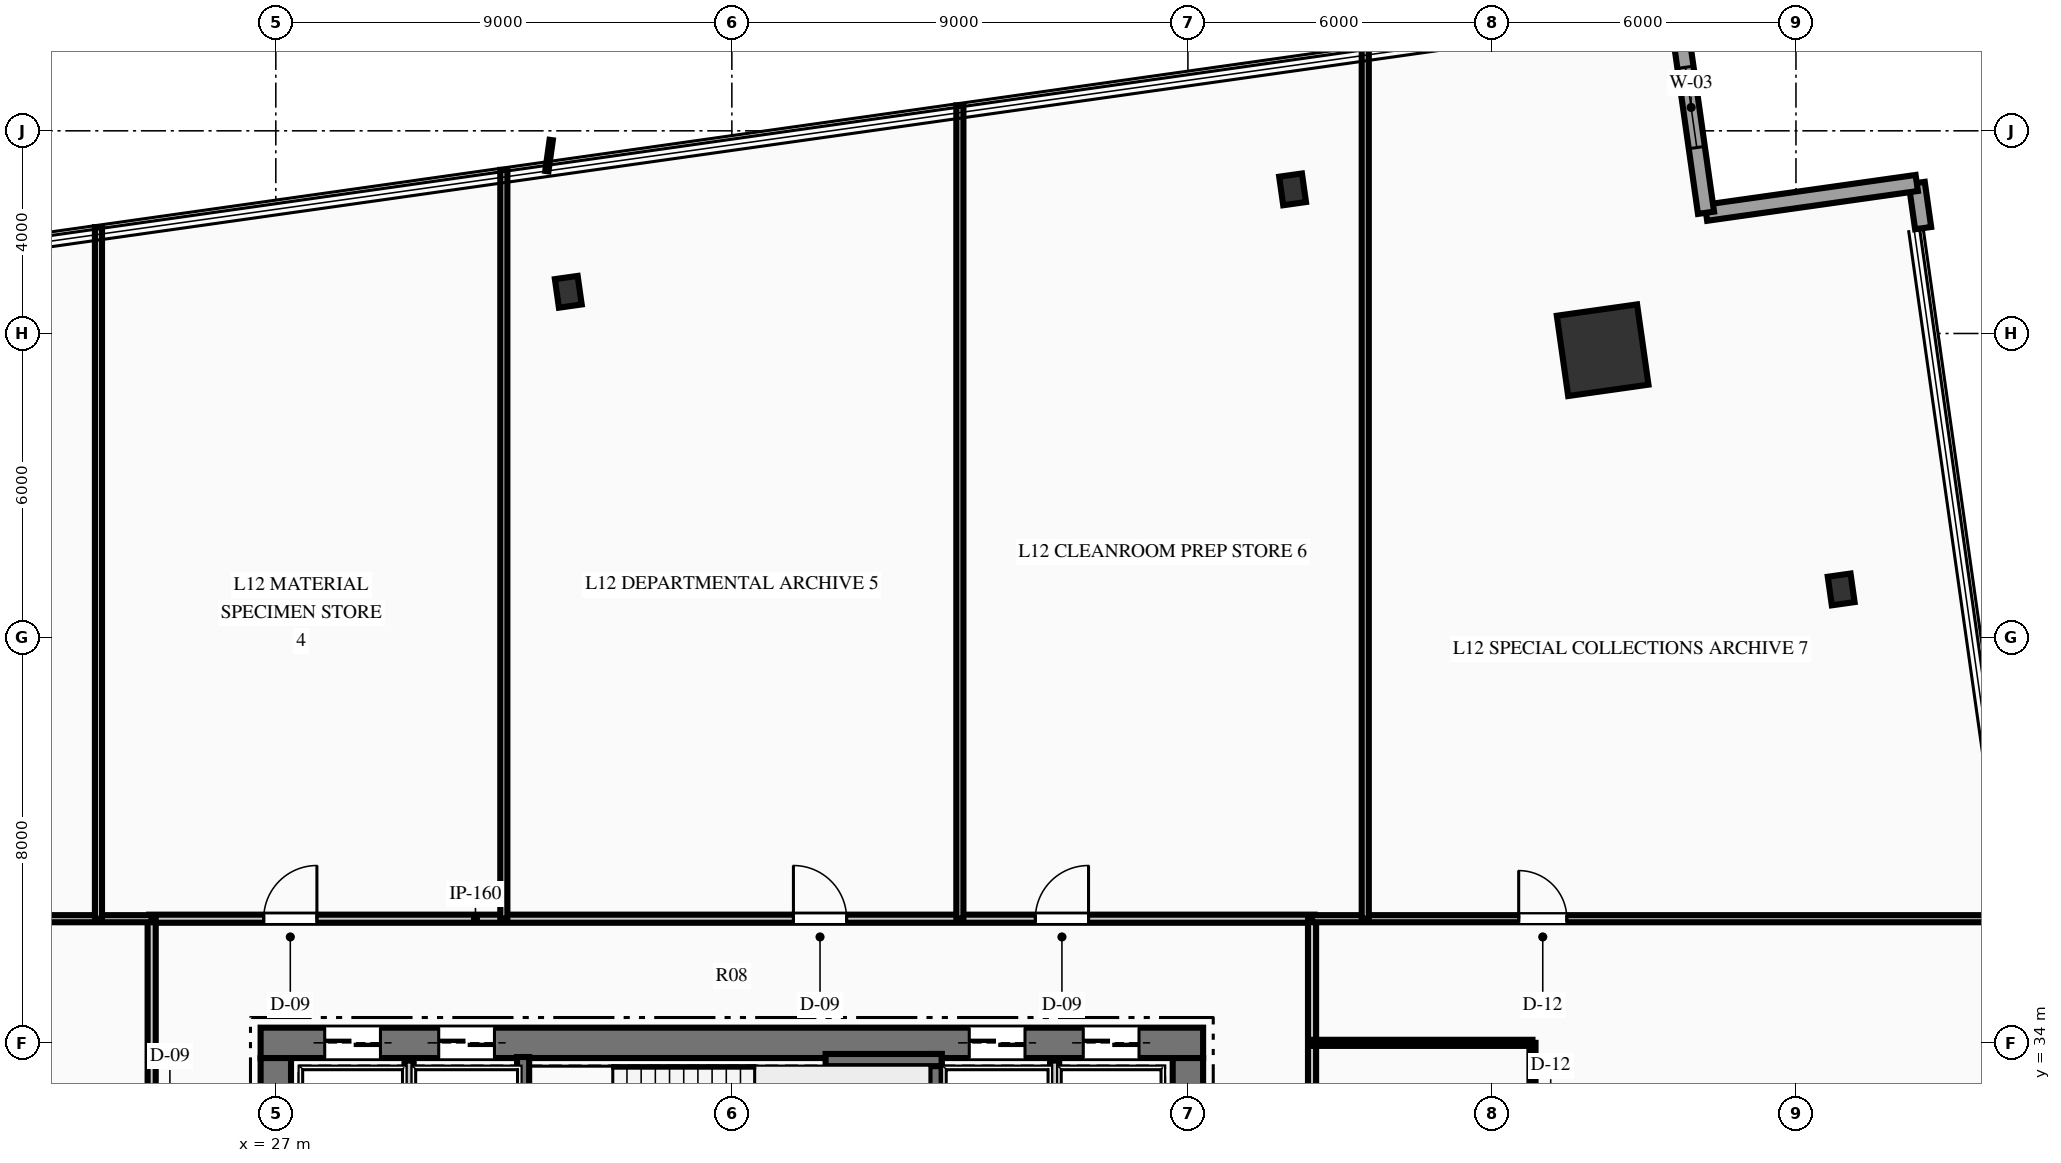
"""IFC4 building model, lengths in metres.
Left out: names, types, materials, properties, quantities, classifications, styles, units other than length and angle.
Written with IfcOpenShell. Run it as: python <this file> out.ifc"""

import sys

from ifc_helpers import new_model, si_unit, direction, frame, frame_2d, origin, origin_2d, place, context, subcontext, project, spatial, rectangle, hollow_rectangle, i_section, extrude, element, fill, save


model = new_model("IFC4")
c1 = context("Model", 3, precision=1e-05, world=origin(), true_north=direction((0.0, 1.0)))
c2 = subcontext(c1, "Body", "Model", "MODEL_VIEW")
j1 = project(units=[si_unit("LENGTHUNIT", "METRE"), si_unit("PLANEANGLEUNIT", "RADIAN")], contexts=[c1])
p1 = place(None, origin())
s1 = spatial("IfcSite", under=j1, at=p1, CompositionType="ELEMENT")
p2 = place(p1, origin())
s2 = spatial("IfcBuilding", under=s1, at=p2, CompositionType="ELEMENT")
p3 = place(p2, frame((0.0, 0.0, 55.2)))
s3 = spatial("IfcBuildingStorey", under=s2, at=p3, CompositionType="ELEMENT", Elevation=55.2)
p4 = place(p3, frame((26.7, 34.0, 0.0), z_axis=(0.0, 0.0, 1.0), x_axis=(1.0, 0.0, 0.0)))
e1 = element("IfcWall", 1, at=p4, inside=s3, PredefinedType="SHEAR", context=c2, shape_type="SweptSolid", body=[
    extrude(rectangle(XDim=18.6, YDim=0.6, at=frame_2d((9.3, 0.0))), origin(), (0.0, 0.0, 1.0), 3.75),
])
p5 = place(p4, frame((1.265, 0.0, 0.0)))
e2 = element("IfcOpeningElement", 2, at=p5, cuts=e1, PredefinedType="OPENING", context=c2, shape_type="SweptSolid", body=[
    extrude(rectangle(XDim=1.1, YDim=2.15, at=frame_2d((0.55, 1.075))), frame((0.0, 0.31, 0.0), z_axis=(0.0, -1.0, 0.0), x_axis=(1.0, 0.0, 0.0)), (0.0, 0.0, 1.0), 0.62),
])
p6 = place(p4, frame((3.515, 0.0, 0.0)))
e3 = element("IfcOpeningElement", 3, at=p6, cuts=e1, PredefinedType="OPENING", context=c2, shape_type="SweptSolid", body=[
    extrude(rectangle(XDim=1.1, YDim=2.15, at=frame_2d((0.55, 1.075))), frame((0.0, 0.31, 0.0), z_axis=(0.0, -1.0, 0.0), x_axis=(1.0, 0.0, 0.0)), (0.0, 0.0, 1.0), 0.62),
])
p7 = place(p4, frame((13.985, 0.0, 0.0)))
e4 = element("IfcOpeningElement", 4, at=p7, cuts=e1, PredefinedType="OPENING", context=c2, shape_type="SweptSolid", body=[
    extrude(rectangle(XDim=1.1, YDim=2.15, at=frame_2d((0.55, 1.075))), frame((0.0, 0.31, 0.0), z_axis=(0.0, -1.0, 0.0), x_axis=(1.0, 0.0, 0.0)), (0.0, 0.0, 1.0), 0.62),
])
p8 = place(p4, frame((16.235, 0.0, 0.0)))
e5 = element("IfcOpeningElement", 5, at=p8, cuts=e1, PredefinedType="OPENING", context=c2, shape_type="SweptSolid", body=[
    extrude(rectangle(XDim=1.1, YDim=2.15, at=frame_2d((0.55, 1.075))), frame((0.0, 0.31, 0.0), z_axis=(0.0, -1.0, 0.0), x_axis=(1.0, 0.0, 0.0)), (0.0, 0.0, 1.0), 0.62),
])
p9 = place(p3, frame((27.0, 18.3, 0.0), z_axis=(0.0, 0.0, 1.0), x_axis=(0.0, 1.0, 0.0)))
e6 = element("IfcWall", 6, at=p9, inside=s3, PredefinedType="SHEAR", context=c2, shape_type="SweptSolid", body=[
    extrude(rectangle(XDim=15.4, YDim=0.6, at=frame_2d((7.7, 0.0))), origin(), (0.0, 0.0, 1.0), 3.75),
])
p10 = place(p9, frame((9.94, 0.0, 0.0)))
e7 = element("IfcOpeningElement", 7, at=p10, cuts=e6, PredefinedType="OPENING", context=c2, shape_type="SweptSolid", body=[
    extrude(rectangle(XDim=1.4, YDim=2.2, at=frame_2d((0.7, 1.1))), frame((0.0, 0.31, 0.0), z_axis=(0.0, -1.0, 0.0), x_axis=(1.0, 0.0, 0.0)), (0.0, 0.0, 1.0), 0.62),
])
p11 = place(p3, frame((45.0, 18.3, 0.0), z_axis=(0.0, 0.0, 1.0), x_axis=(0.0, 1.0, 0.0)))
e8 = element("IfcWall", 8, at=p11, inside=s3, PredefinedType="SHEAR", context=c2, shape_type="SweptSolid", body=[
    extrude(rectangle(XDim=15.4, YDim=0.6, at=frame_2d((7.7, 0.0))), origin(), (0.0, 0.0, 1.0), 3.75),
])
p12 = place(p11, frame((9.94, 0.0, 0.0)))
e9 = element("IfcOpeningElement", 9, at=p12, cuts=e8, PredefinedType="OPENING", context=c2, shape_type="SweptSolid", body=[
    extrude(rectangle(XDim=1.4, YDim=2.2, at=frame_2d((0.7, 1.1))), frame((0.0, 0.31, 0.0), z_axis=(0.0, -1.0, 0.0), x_axis=(1.0, 0.0, 0.0)), (0.0, 0.0, 1.0), 0.62),
])
p13 = place(p3, frame((31.88, 29.93, 0.0), z_axis=(0.0, 0.0, 1.0), x_axis=(0.0, 1.0, 0.0)))
e10 = element("IfcWall", 10, at=p13, inside=s3, PredefinedType="SHEAR", context=c2, shape_type="SweptSolid", body=[
    extrude(rectangle(XDim=3.79, YDim=0.24, at=frame_2d((1.895, 0.0))), origin(), (0.0, 0.0, 1.0), 3.75),
])
p14 = place(p3, frame((40.02, 29.93, 0.0), z_axis=(0.0, 0.0, 1.0), x_axis=(0.0, 1.0, 0.0)))
e11 = element("IfcWall", 11, at=p14, inside=s3, PredefinedType="SHEAR", context=c2, shape_type="SweptSolid", body=[
    extrude(rectangle(XDim=3.85, YDim=0.24, at=frame_2d((1.925, 0.0))), origin(), (0.0, 0.0, 1.0), 3.75),
])
p15 = place(p3, frame((37.85, 33.66, 0.0), z_axis=(0.0, 0.0, 1.0), x_axis=(1.0, 0.0, 0.0)))
e12 = element("IfcWall", 12, at=p15, inside=s3, PredefinedType="SHEAR", context=c2, shape_type="SweptSolid", body=[
    extrude(rectangle(XDim=2.29, YDim=0.24, at=frame_2d((1.145, 0.0))), origin(), (0.0, 0.0, 1.0), 3.75),
])
p16 = place(p3, frame((53.185, 47.67, 0.0), z_axis=(0.0, 0.0, 1.0), x_axis=(0.990146240249, 0.140037219771, 0.0)))
e13 = element("IfcColumn", 13, at=p16, inside=s3, PredefinedType="COLUMN", context=c2, shape_type="SweptSolid", body=[
    extrude(hollow_rectangle(XDim=1.6, YDim=1.6, WallThickness=0.08, at=origin_2d()), origin(), (0.0, 0.0, 1.0), 3.75),
])
for number, where, z_axis, x_axis in (
    (14, (57.892, 42.949, 0.0), (0.0, 0.0, 1.0), (0.99, 0.14, 0.0)),
    (15, (47.066, 50.844, 0.0), (0.0, 0.0, 1.0), (0.99, 0.14, 0.0)),
    (16, (32.772, 48.823, 0.0), (0.0, 0.0, 1.0), (0.99, 0.14, 0.0)),
):
    element("IfcColumn", number, at=place(p3, frame(where, z_axis=z_axis, x_axis=x_axis)), inside=s3, PredefinedType="COLUMN", context=c2, shape_type="SweptSolid", body=[
        extrude(i_section(OverallWidth=0.454, OverallDepth=0.569, WebThickness=0.078, FlangeThickness=0.125, at=origin_2d()), origin(), (0.0, 0.0, 1.0), 3.75),
    ])
p17 = place(p3, frame((59.384, 50.971, 0.0), z_axis=(0.0, 0.0, 1.0), x_axis=(0.139978021702, -0.990154610877, 0.0)))
e17 = element("IfcWall", 17, at=p17, inside=s3, PredefinedType="STANDARD", context=c2, shape_type="SweptSolid", body=[
    extrude(rectangle(XDim=0.9, YDim=0.32, at=frame_2d((0.45, 0.0))), origin(), (0.0, 0.0, 1.0), 3.44),
])
p18 = place(p3, frame((55.225, 50.383, 0.0), z_axis=(0.0, 0.0, 1.0), x_axis=(0.990146172451, 0.140037699139, 0.0)))
e18 = element("IfcWall", 18, at=p18, inside=s3, PredefinedType="STANDARD", context=c2, shape_type="SweptSolid", body=[
    extrude(rectangle(XDim=4.2, YDim=0.32, at=frame_2d((2.1, 0.0))), origin(), (0.0, 0.0, 1.0), 3.44),
])
p19 = place(p3, frame((54.637, 54.541, 0.0), z_axis=(0.0, 0.0, 1.0), x_axis=(0.140094689511, -0.990138110554, 0.0)))
e19 = element("IfcWall", 19, at=p19, inside=s3, PredefinedType="STANDARD", context=c2, shape_type="SweptSolid", body=[
    extrude(rectangle(XDim=4.2, YDim=0.32, at=frame_2d((2.1, 0.0))), origin(), (0.0, 0.0, 1.0), 3.44),
])
p20 = place(p19, frame((1.3, 0.0, 0.85)))
e20 = element("IfcOpeningElement", 20, at=p20, cuts=e19, PredefinedType="OPENING", context=c2, shape_type="SweptSolid", body=[
    extrude(rectangle(XDim=1.6, YDim=2.1, at=frame_2d((0.8, 1.05))), frame((0.0, 0.17, 0.0), z_axis=(0.0, -1.0, 0.0), x_axis=(1.0, 0.0, 0.0)), (0.0, 0.0, 1.0), 0.34),
])
for number, where, z_axis, x_axis in (
    (21, (29.63, 29.9, 0.0), (0.0, 0.0, 1.0), (0.0, 1.0, 0.0)),
    (22, (42.37, 29.9, 0.0), (0.0, 0.0, 1.0), (0.0, 1.0, 0.0)),
):
    element("IfcWall", number, at=place(p3, frame(where, z_axis=z_axis, x_axis=x_axis)), inside=s3, PredefinedType="PARTITIONING", context=c2, shape_type="SweptSolid", body=[
        extrude(rectangle(XDim=3.75, YDim=0.18, at=frame_2d((1.875, 0.0))), origin(), (0.0, 0.0, 1.0), 3.44),
    ])
p21 = place(p3, frame((24.5, 36.45, 0.0), z_axis=(0.0, 0.0, 1.0), x_axis=(1.0, 0.0, 0.0)))
e23 = element("IfcWall", 23, at=p21, inside=s3, PredefinedType="PARTITIONING", context=c2, shape_type="SweptSolid", body=[
    extrude(rectangle(XDim=23.0, YDim=0.16, at=frame_2d((11.5, 0.0))), origin(), (0.0, 0.0, 1.0), 3.44),
])
p22 = place(p21, frame((2.261, 0.0, 0.0)))
e24 = element("IfcOpeningElement", 24, at=p22, cuts=e23, PredefinedType="OPENING", context=c2, shape_type="SweptSolid", body=[
    extrude(rectangle(XDim=1.05, YDim=2.15, at=frame_2d((0.525, 1.075))), frame((0.0, 0.09, 0.0), z_axis=(0.0, -1.0, 0.0), x_axis=(1.0, 0.0, 0.0)), (0.0, 0.0, 1.0), 0.18),
])
p23 = place(p21, frame((12.715, 0.0, 0.0)))
e25 = element("IfcOpeningElement", 25, at=p23, cuts=e23, PredefinedType="OPENING", context=c2, shape_type="SweptSolid", body=[
    extrude(rectangle(XDim=1.05, YDim=2.15, at=frame_2d((0.525, 1.075))), frame((0.0, 0.09, 0.0), z_axis=(0.0, -1.0, 0.0), x_axis=(1.0, 0.0, 0.0)), (0.0, 0.0, 1.0), 0.18),
])
p24 = place(p21, frame((17.489, 0.0, 0.0)))
e26 = element("IfcOpeningElement", 26, at=p24, cuts=e23, PredefinedType="OPENING", context=c2, shape_type="SweptSolid", body=[
    extrude(rectangle(XDim=1.05, YDim=2.15, at=frame_2d((0.525, 1.075))), frame((0.0, 0.09, 0.0), z_axis=(0.0, -1.0, 0.0), x_axis=(1.0, 0.0, 0.0)), (0.0, 0.0, 1.0), 0.18),
])
p25 = place(p3, frame((24.55, 15.55, 0.0), z_axis=(0.0, 0.0, 1.0), x_axis=(0.0, 1.0, 0.0)))
e27 = element("IfcWall", 27, at=p25, inside=s3, PredefinedType="PARTITIONING", context=c2, shape_type="SweptSolid", body=[
    extrude(rectangle(XDim=20.9, YDim=0.16, at=frame_2d((10.45, 0.0))), origin(), (0.0, 0.0, 1.0), 3.44),
])
p26 = place(p25, frame((2.445, 0.0, 0.0)))
e28 = element("IfcOpeningElement", 28, at=p26, cuts=e27, PredefinedType="OPENING", context=c2, shape_type="SweptSolid", body=[
    extrude(rectangle(XDim=1.05, YDim=2.15, at=frame_2d((0.525, 1.075))), frame((0.0, 0.09, 0.0), z_axis=(0.0, -1.0, 0.0), x_axis=(1.0, 0.0, 0.0)), (0.0, 0.0, 1.0), 0.18),
])
p27 = place(p25, frame((12.829, 0.0, 0.0)))
e29 = element("IfcOpeningElement", 29, at=p27, cuts=e27, PredefinedType="OPENING", context=c2, shape_type="SweptSolid", body=[
    extrude(rectangle(XDim=1.05, YDim=2.15, at=frame_2d((0.525, 1.075))), frame((0.0, 0.09, 0.0), z_axis=(0.0, -1.0, 0.0), x_axis=(1.0, 0.0, 0.0)), (0.0, 0.0, 1.0), 0.18),
])
p28 = place(p25, frame((16.307, 0.0, 0.0)))
e30 = element("IfcOpeningElement", 30, at=p28, cuts=e27, PredefinedType="OPENING", context=c2, shape_type="SweptSolid", body=[
    extrude(rectangle(XDim=1.05, YDim=2.15, at=frame_2d((0.525, 1.075))), frame((0.0, 0.09, 0.0), z_axis=(0.0, -1.0, 0.0), x_axis=(1.0, 0.0, 0.0)), (0.0, 0.0, 1.0), 0.18),
])
p29 = place(p3, frame((47.45, 15.55, 0.0), z_axis=(0.0, 0.0, 1.0), x_axis=(0.0, 1.0, 0.0)))
e31 = element("IfcWall", 31, at=p29, inside=s3, PredefinedType="PARTITIONING", context=c2, shape_type="SweptSolid", body=[
    extrude(rectangle(XDim=20.9, YDim=0.16, at=frame_2d((10.45, 0.0))), origin(), (0.0, 0.0, 1.0), 3.44),
])
p30 = place(p29, frame((14.975, 0.0, 0.0)))
e32 = element("IfcOpeningElement", 32, at=p30, cuts=e31, PredefinedType="OPENING", context=c2, shape_type="SweptSolid", body=[
    extrude(rectangle(XDim=0.95, YDim=2.15, at=frame_2d((0.475, 1.075))), frame((0.0, 0.09, 0.0), z_axis=(0.0, -1.0, 0.0), x_axis=(1.0, 0.0, 0.0)), (0.0, 0.0, 1.0), 0.18),
])
p31 = place(p29, frame((5.54, 0.0, 0.0)))
e33 = element("IfcOpeningElement", 33, at=p31, cuts=e31, PredefinedType="OPENING", context=c2, shape_type="SweptSolid", body=[
    extrude(rectangle(XDim=1.05, YDim=2.15, at=frame_2d((0.525, 1.075))), frame((0.0, 0.09, 0.0), z_axis=(0.0, -1.0, 0.0), x_axis=(1.0, 0.0, 0.0)), (0.0, 0.0, 1.0), 0.18),
])
p32 = place(p29, frame((9.791, 0.0, 0.0)))
e34 = element("IfcOpeningElement", 34, at=p32, cuts=e31, PredefinedType="OPENING", context=c2, shape_type="SweptSolid", body=[
    extrude(rectangle(XDim=1.05, YDim=2.15, at=frame_2d((0.525, 1.075))), frame((0.0, 0.09, 0.0), z_axis=(0.0, -1.0, 0.0), x_axis=(1.0, 0.0, 0.0)), (0.0, 0.0, 1.0), 0.18),
])
p33 = place(p3, frame((7.647, 36.45, 0.0), z_axis=(0.0, 0.0, 1.0), x_axis=(1.0, 0.0, 0.0)))
e35 = element("IfcWall", 35, at=p33, inside=s3, PredefinedType="PARTITIONING", context=c2, shape_type="SweptSolid", body=[
    extrude(rectangle(XDim=16.903, YDim=0.14, at=frame_2d((8.451, 0.0))), origin(), (0.0, 0.0, 1.0), 2.739),
])
p34 = place(p33, frame((10.922, 0.0, 0.0)))
e36 = element("IfcOpeningElement", 36, at=p34, cuts=e35, PredefinedType="OPENING", context=c2, shape_type="SweptSolid", body=[
    extrude(rectangle(XDim=0.95, YDim=2.15, at=frame_2d((0.475, 1.075))), frame((0.0, 0.08, 0.0), z_axis=(0.0, -1.0, 0.0), x_axis=(1.0, 0.0, 0.0)), (0.0, 0.0, 1.0), 0.16),
])
p35 = place(p3, frame((47.45, 36.45, 0.0), z_axis=(0.0, 0.0, 1.0), x_axis=(1.0, 0.0, 0.0)))
e37 = element("IfcWall", 37, at=p35, inside=s3, PredefinedType="PARTITIONING", context=c2, shape_type="SweptSolid", body=[
    extrude(rectangle(XDim=13.947, YDim=0.14, at=frame_2d((6.974, 0.0))), origin(), (0.0, 0.0, 1.0), 3.44),
])
p36 = place(p35, frame((4.078, 0.0, 0.0)))
e38 = element("IfcOpeningElement", 38, at=p36, cuts=e37, PredefinedType="OPENING", context=c2, shape_type="SweptSolid", body=[
    extrude(rectangle(XDim=0.95, YDim=2.15, at=frame_2d((0.475, 1.075))), frame((0.0, 0.08, 0.0), z_axis=(0.0, -1.0, 0.0), x_axis=(1.0, 0.0, 0.0)), (0.0, 0.0, 1.0), 0.16),
])
p37 = place(p3, frame((23.5, 36.45, 0.0), z_axis=(0.0, 0.0, 1.0), x_axis=(0.0, 1.0, 0.0)))
e39 = element("IfcWall", 39, at=p37, inside=s3, PredefinedType="PARTITIONING", context=c2, shape_type="SweptSolid", body=[
    extrude(rectangle(XDim=13.647, YDim=0.14, at=frame_2d((6.823, 0.0))), origin(), (0.0, 0.0, 1.0), 3.44),
])
p38 = place(p3, frame((31.5, 36.45, 0.0), z_axis=(0.0, 0.0, 1.0), x_axis=(0.0, 1.0, 0.0)))
e40 = element("IfcWall", 40, at=p38, inside=s3, PredefinedType="PARTITIONING", context=c2, shape_type="SweptSolid", body=[
    extrude(rectangle(XDim=14.779, YDim=0.14, at=frame_2d((7.389, 0.0))), origin(), (0.0, 0.0, 1.0), 3.44),
])
p39 = place(p3, frame((40.5, 36.45, 0.0), z_axis=(0.0, 0.0, 1.0), x_axis=(0.0, 1.0, 0.0)))
e41 = element("IfcWall", 41, at=p39, inside=s3, PredefinedType="PARTITIONING", context=c2, shape_type="SweptSolid", body=[
    extrude(rectangle(XDim=16.051, YDim=0.14, at=frame_2d((8.026, 0.0))), origin(), (0.0, 0.0, 1.0), 3.44),
])
p40 = place(p3, frame((48.5, 36.45, 0.0), z_axis=(0.0, 0.0, 1.0), x_axis=(0.0, 1.0, 0.0)))
e42 = element("IfcWall", 42, at=p40, inside=s3, PredefinedType="PARTITIONING", context=c2, shape_type="SweptSolid", body=[
    extrude(rectangle(XDim=17.183, YDim=0.14, at=frame_2d((8.591, 0.0))), origin(), (0.0, 0.0, 1.0), 3.44),
])
p41 = place(p3, frame((47.45, 34.0, 0.0), z_axis=(0.0, 0.0, 1.0), x_axis=(1.0, 0.0, 0.0)))
e43 = element("IfcWall", 43, at=p41, inside=s3, PredefinedType="PARTITIONING", context=c2, shape_type="SweptSolid", body=[
    extrude(rectangle(XDim=4.35, YDim=0.12, at=frame_2d((2.175, 0.0))), origin(), (0.0, 0.0, 1.0), 3.44),
])
p42 = place(p3, frame((51.8, 28.0, 0.0), z_axis=(0.0, 0.0, 1.0), x_axis=(0.0, 1.0, 0.0)))
e44 = element("IfcWall", 44, at=p42, inside=s3, PredefinedType="PARTITIONING", context=c2, shape_type="SweptSolid", body=[
    extrude(rectangle(XDim=6.0, YDim=0.12, at=frame_2d((3.0, 0.0))), origin(), (0.0, 0.0, 1.0), 3.44),
])
p43 = place(p42, frame((3.725, 0.0, 0.0)))
e45 = element("IfcOpeningElement", 45, at=p43, cuts=e44, PredefinedType="OPENING", context=c2, shape_type="SweptSolid", body=[
    extrude(rectangle(XDim=0.95, YDim=2.15, at=frame_2d((0.475, 1.075))), frame((0.0, 0.07, 0.0), z_axis=(0.0, -1.0, 0.0), x_axis=(1.0, 0.0, 0.0)), (0.0, 0.0, 1.0), 0.14),
])
p44 = place(p20, origin())
e46 = element("IfcWindow", 46, at=p44, inside=s3, PartitioningType="SINGLE_PANEL", PredefinedType="WINDOW", context=c2, shape_type="SweptSolid", body=[
    extrude(rectangle(XDim=1.6, YDim=2.1, at=frame_2d((0.8, 1.05))), frame((0.0, 0.03, 0.0), z_axis=(0.0, -1.0, 0.0), x_axis=(1.0, 0.0, 0.0)), (0.0, 0.0, 1.0), 0.06),
])
fill(e20, e46)
p45 = place(p22, origin())
e47 = element("IfcDoor", 47, at=p45, inside=s3, OperationType="SINGLE_SWING_RIGHT", PredefinedType="DOOR", context=c2, shape_type="SweptSolid", body=[
    extrude(rectangle(XDim=1.05, YDim=2.15, at=frame_2d((0.525, 1.075))), frame((0.0, 0.025, 0.0), z_axis=(0.0, -1.0, 0.0), x_axis=(1.0, 0.0, 0.0)), (0.0, 0.0, 1.0), 0.05),
])
fill(e24, e47)
p46 = place(p23, origin())
e48 = element("IfcDoor", 48, at=p46, inside=s3, OperationType="SINGLE_SWING_LEFT", PredefinedType="DOOR", context=c2, shape_type="SweptSolid", body=[
    extrude(rectangle(XDim=1.05, YDim=2.15, at=frame_2d((0.525, 1.075))), frame((0.0, 0.025, 0.0), z_axis=(0.0, -1.0, 0.0), x_axis=(1.0, 0.0, 0.0)), (0.0, 0.0, 1.0), 0.05),
])
fill(e25, e48)
p47 = place(p24, origin())
e49 = element("IfcDoor", 49, at=p47, inside=s3, OperationType="SINGLE_SWING_RIGHT", PredefinedType="DOOR", context=c2, shape_type="SweptSolid", body=[
    extrude(rectangle(XDim=1.05, YDim=2.15, at=frame_2d((0.525, 1.075))), frame((0.0, 0.025, 0.0), z_axis=(0.0, -1.0, 0.0), x_axis=(1.0, 0.0, 0.0)), (0.0, 0.0, 1.0), 0.05),
])
fill(e26, e49)
p48 = place(p36, origin())
e50 = element("IfcDoor", 50, at=p48, inside=s3, OperationType="SINGLE_SWING_LEFT", PredefinedType="DOOR", context=c2, shape_type="SweptSolid", body=[
    extrude(rectangle(XDim=0.95, YDim=2.15, at=frame_2d((0.475, 1.075))), frame((0.0, 0.025, 0.0), z_axis=(0.0, -1.0, 0.0), x_axis=(1.0, 0.0, 0.0)), (0.0, 0.0, 1.0), 0.05),
])
fill(e38, e50)
p49 = place(p5, origin())
e51 = element("IfcDoor", 51, at=p49, inside=s3, OperationType="SLIDING_TO_LEFT", PredefinedType="DOOR", context=c2, shape_type="SweptSolid", body=[
    extrude(rectangle(XDim=1.1, YDim=2.15, at=frame_2d((0.55, 1.075))), frame((0.0, 0.025, 0.0), z_axis=(0.0, -1.0, 0.0), x_axis=(1.0, 0.0, 0.0)), (0.0, 0.0, 1.0), 0.05),
])
fill(e2, e51)
p50 = place(p6, origin())
e52 = element("IfcDoor", 52, at=p50, inside=s3, OperationType="SLIDING_TO_LEFT", PredefinedType="DOOR", context=c2, shape_type="SweptSolid", body=[
    extrude(rectangle(XDim=1.1, YDim=2.15, at=frame_2d((0.55, 1.075))), frame((0.0, 0.025, 0.0), z_axis=(0.0, -1.0, 0.0), x_axis=(1.0, 0.0, 0.0)), (0.0, 0.0, 1.0), 0.05),
])
fill(e3, e52)
p51 = place(p7, origin())
e53 = element("IfcDoor", 53, at=p51, inside=s3, OperationType="SLIDING_TO_LEFT", PredefinedType="DOOR", context=c2, shape_type="SweptSolid", body=[
    extrude(rectangle(XDim=1.1, YDim=2.15, at=frame_2d((0.55, 1.075))), frame((0.0, 0.025, 0.0), z_axis=(0.0, -1.0, 0.0), x_axis=(1.0, 0.0, 0.0)), (0.0, 0.0, 1.0), 0.05),
])
fill(e4, e53)
p52 = place(p8, origin())
e54 = element("IfcDoor", 54, at=p52, inside=s3, OperationType="SLIDING_TO_LEFT", PredefinedType="DOOR", context=c2, shape_type="SweptSolid", body=[
    extrude(rectangle(XDim=1.1, YDim=2.15, at=frame_2d((0.55, 1.075))), frame((0.0, 0.025, 0.0), z_axis=(0.0, -1.0, 0.0), x_axis=(1.0, 0.0, 0.0)), (0.0, 0.0, 1.0), 0.05),
])
fill(e5, e54)
save(model, sys.argv[1])
